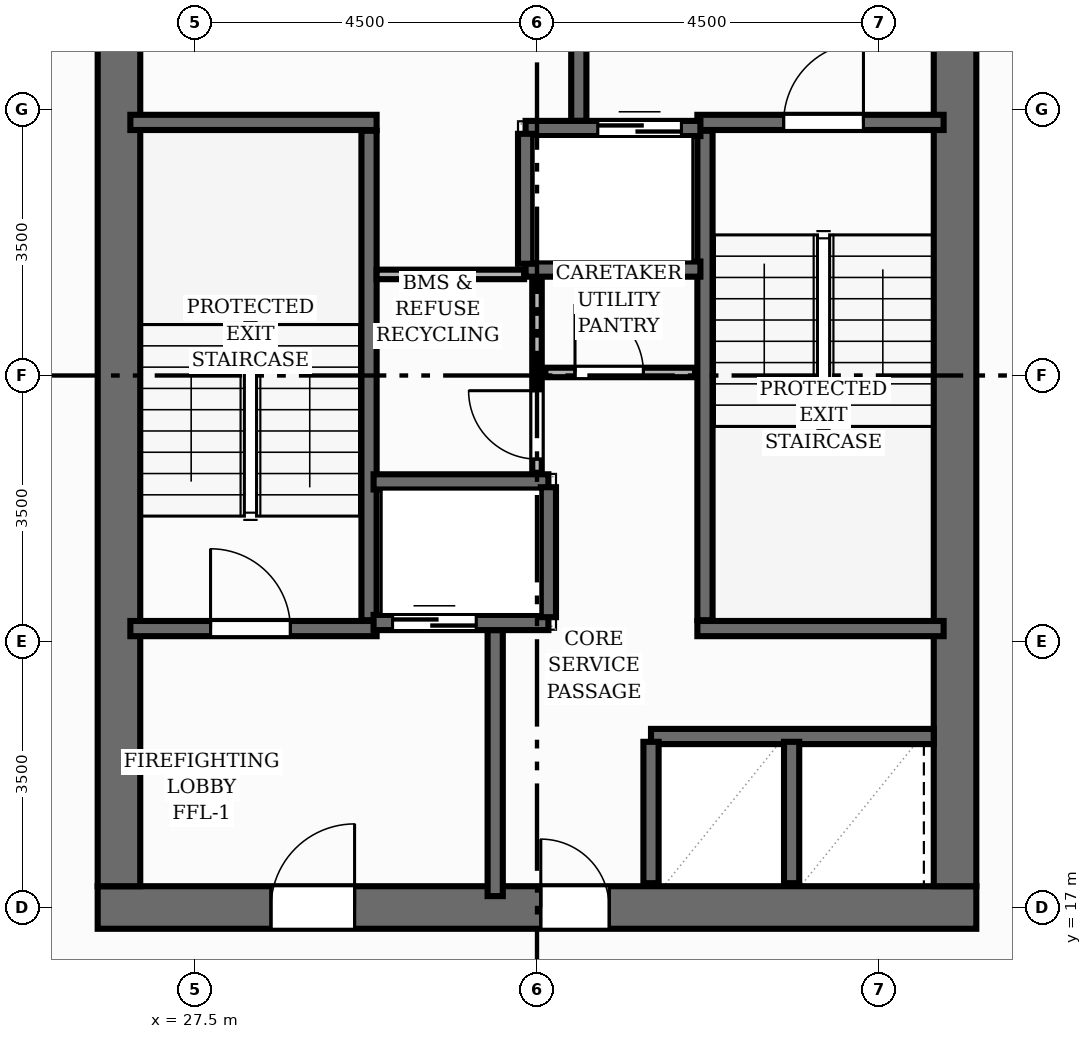
"""IFC4 building model, lengths in metres.
Left out: names, types, materials, properties, quantities, classifications, styles, units other than length and angle.
Written with IfcOpenShell. Run it as: python <this file> out.ifc"""

import sys

from ifc_helpers import new_model, si_unit, direction, frame, frame_2d, origin, place, context, subcontext, project, spatial, rectangle, extrude, element, fill, save


model = new_model("IFC4")
c1 = context("Model", 3, precision=1e-05, world=origin(), true_north=direction((0.0, 1.0)))
c2 = subcontext(c1, "Body", "Model", "MODEL_VIEW")
j1 = project(units=[si_unit("LENGTHUNIT", "METRE"), si_unit("PLANEANGLEUNIT", "RADIAN")], contexts=[c1])
p1 = place(None, origin())
s1 = spatial("IfcSite", under=j1, at=p1, CompositionType="ELEMENT")
p2 = place(p1, origin())
s2 = spatial("IfcBuilding", under=s1, at=p2, CompositionType="ELEMENT")
p3 = place(p2, frame((0.0, 0.0, 172.64)))
s3 = spatial("IfcBuildingStorey", under=s2, at=p3, CompositionType="ELEMENT", Elevation=172.64)
p4 = place(p3, frame((26.22, 17.0, 0.0), z_axis=(0.0, 0.0, 1.0), x_axis=(1.0, 0.0, 0.0)))
e1 = element("IfcWall", 1, at=p4, inside=s3, PredefinedType="SHEAR", context=c2, shape_type="SweptSolid", body=[
    extrude(rectangle(XDim=11.56, YDim=0.56, at=frame_2d((5.78, 0.0))), origin(), (0.0, 0.0, 1.0), 3.2),
])
p5 = place(p4, frame((2.28, 0.0, 0.0)))
e2 = element("IfcOpeningElement", 2, at=p5, cuts=e1, PredefinedType="OPENING", context=c2, shape_type="SweptSolid", body=[
    extrude(rectangle(XDim=1.1, YDim=2.15, at=frame_2d((0.55, 1.075))), frame((0.0, 0.29, 0.0), z_axis=(0.0, -1.0, 0.0), x_axis=(1.0, 0.0, 0.0)), (0.0, 0.0, 1.0), 0.58),
])
p6 = place(p4, frame((5.83, 0.0, 0.0)))
e3 = element("IfcOpeningElement", 3, at=p6, cuts=e1, PredefinedType="OPENING", context=c2, shape_type="SweptSolid", body=[
    extrude(rectangle(XDim=0.9, YDim=2.1, at=frame_2d((0.45, 1.05))), frame((0.0, 0.29, 0.0), z_axis=(0.0, -1.0, 0.0), x_axis=(1.0, 0.0, 0.0)), (0.0, 0.0, 1.0), 0.58),
])
for number, where, z_axis, x_axis in (
    (4, (26.5, 17.28, 0.0), (0.0, 0.0, 1.0), (0.0, 1.0, 0.0)),
    (5, (37.5, 17.28, 0.0), (0.0, 0.0, 1.0), (0.0, 1.0, 0.0)),
):
    element("IfcWall", number, at=place(p3, frame(where, z_axis=z_axis, x_axis=x_axis)), inside=s3, PredefinedType="SHEAR", context=c2, shape_type="SweptSolid", body=[
        extrude(rectangle(XDim=13.44, YDim=0.56, at=frame_2d((6.72, 0.0))), origin(), (0.0, 0.0, 1.0), 3.2),
    ])
p7 = place(p3, frame((29.79, 20.78, 0.0), z_axis=(0.0, 0.0, 1.0), x_axis=(0.0, 1.0, 0.0)))
e6 = element("IfcWall", 6, at=p7, inside=s3, PredefinedType="SHEAR", context=c2, shape_type="SweptSolid", body=[
    extrude(rectangle(XDim=6.44, YDim=0.2, at=frame_2d((3.22, 0.0))), origin(), (0.0, 0.0, 1.0), 3.2),
])
p8 = place(p3, frame((26.65, 27.33, 0.0), z_axis=(0.0, 0.0, 1.0), x_axis=(1.0, 0.0, 0.0)))
e7 = element("IfcWall", 7, at=p8, inside=s3, PredefinedType="SHEAR", context=c2, shape_type="SweptSolid", body=[
    extrude(rectangle(XDim=3.24, YDim=0.2, at=frame_2d((1.62, 0.0))), origin(), (0.0, 0.0, 1.0), 3.2),
])
p9 = place(p3, frame((26.65, 20.67, 0.0), z_axis=(0.0, 0.0, 1.0), x_axis=(1.0, 0.0, 0.0)))
e8 = element("IfcWall", 8, at=p9, inside=s3, PredefinedType="SHEAR", context=c2, shape_type="SweptSolid", body=[
    extrude(rectangle(XDim=3.24, YDim=0.2, at=frame_2d((1.62, 0.0))), origin(), (0.0, 0.0, 1.0), 3.2),
])
p10 = place(p9, frame((1.055, 0.0, 0.0)))
e9 = element("IfcOpeningElement", 9, at=p10, cuts=e8, PredefinedType="OPENING", context=c2, shape_type="SweptSolid", body=[
    extrude(rectangle(XDim=1.05, YDim=2.15, at=frame_2d((0.525, 1.075))), frame((0.0, 0.11, 0.0), z_axis=(0.0, -1.0, 0.0), x_axis=(1.0, 0.0, 0.0)), (0.0, 0.0, 1.0), 0.22),
])
p11 = place(p3, frame((34.21, 20.78, 0.0), z_axis=(0.0, 0.0, 1.0), x_axis=(0.0, 1.0, 0.0)))
e10 = element("IfcWall", 10, at=p11, inside=s3, PredefinedType="SHEAR", context=c2, shape_type="SweptSolid", body=[
    extrude(rectangle(XDim=6.44, YDim=0.2, at=frame_2d((3.22, 0.0))), origin(), (0.0, 0.0, 1.0), 3.2),
])
p12 = place(p3, frame((34.11, 20.67, 0.0), z_axis=(0.0, 0.0, 1.0), x_axis=(1.0, 0.0, 0.0)))
e11 = element("IfcWall", 11, at=p12, inside=s3, PredefinedType="SHEAR", context=c2, shape_type="SweptSolid", body=[
    extrude(rectangle(XDim=3.24, YDim=0.2, at=frame_2d((1.62, 0.0))), origin(), (0.0, 0.0, 1.0), 3.2),
])
p13 = place(p3, frame((34.11, 27.33, 0.0), z_axis=(0.0, 0.0, 1.0), x_axis=(1.0, 0.0, 0.0)))
e12 = element("IfcWall", 12, at=p13, inside=s3, PredefinedType="SHEAR", context=c2, shape_type="SweptSolid", body=[
    extrude(rectangle(XDim=3.24, YDim=0.2, at=frame_2d((1.62, 0.0))), origin(), (0.0, 0.0, 1.0), 3.2),
])
p14 = place(p13, frame((1.135, 0.0, 0.0)))
e13 = element("IfcOpeningElement", 13, at=p14, cuts=e12, PredefinedType="OPENING", context=c2, shape_type="SweptSolid", body=[
    extrude(rectangle(XDim=1.05, YDim=2.15, at=frame_2d((0.525, 1.075))), frame((0.0, 0.11, 0.0), z_axis=(0.0, -1.0, 0.0), x_axis=(1.0, 0.0, 0.0)), (0.0, 0.0, 1.0), 0.22),
])
for number, where, z_axis, x_axis in (
    (14, (31.45, 17.15, 0.0), (0.0, 0.0, 1.0), (0.0, 1.0, 0.0)),
    (15, (32.55, 27.35, 0.0), (0.0, 0.0, 1.0), (0.0, 1.0, 0.0)),
):
    element("IfcWall", number, at=place(p3, frame(where, z_axis=z_axis, x_axis=x_axis)), inside=s3, PredefinedType="SHEAR", context=c2, shape_type="SweptSolid", body=[
        extrude(rectangle(XDim=3.5, YDim=0.2, at=frame_2d((1.75, 0.0))), origin(), (0.0, 0.0, 1.0), 3.2),
    ])
p15 = place(p3, frame((29.85, 20.75, 0.0), z_axis=(0.0, 0.0, 1.0), x_axis=(1.0, 0.0, 0.0)))
e16 = element("IfcWall", 16, at=p15, inside=s3, PredefinedType="SHEAR", context=c2, shape_type="SweptSolid", body=[
    extrude(rectangle(XDim=2.3, YDim=0.2, at=frame_2d((1.15, 0.0))), origin(), (0.0, 0.0, 1.0), 3.2),
])
p16 = place(p15, frame((0.25, 0.0, 0.0)))
e17 = element("IfcOpeningElement", 17, at=p16, cuts=e16, PredefinedType="OPENING", context=c2, shape_type="SweptSolid", body=[
    extrude(rectangle(XDim=1.1, YDim=2.15, at=frame_2d((0.55, 1.075))), frame((0.0, 0.11, 0.0), z_axis=(0.0, -1.0, 0.0), x_axis=(1.0, 0.0, 0.0)), (0.0, 0.0, 1.0), 0.22),
])
p17 = place(p3, frame((29.85, 22.6, 0.0), z_axis=(0.0, 0.0, 1.0), x_axis=(1.0, 0.0, 0.0)))
e18 = element("IfcWall", 18, at=p17, inside=s3, PredefinedType="SHEAR", context=c2, shape_type="SweptSolid", body=[
    extrude(rectangle(XDim=2.3, YDim=0.2, at=frame_2d((1.15, 0.0))), origin(), (0.0, 0.0, 1.0), 3.2),
])
p18 = place(p3, frame((32.15, 20.82, 0.0), z_axis=(0.0, 0.0, 1.0), x_axis=(0.0, 1.0, 0.0)))
e19 = element("IfcWall", 19, at=p18, inside=s3, PredefinedType="SHEAR", context=c2, shape_type="SweptSolid", body=[
    extrude(rectangle(XDim=1.71, YDim=0.2, at=frame_2d((0.855, 0.0))), origin(), (0.0, 0.0, 1.0), 3.2),
])
p19 = place(p3, frame((31.85, 27.25, 0.0), z_axis=(0.0, 0.0, 1.0), x_axis=(1.0, 0.0, 0.0)))
e20 = element("IfcWall", 20, at=p19, inside=s3, PredefinedType="SHEAR", context=c2, shape_type="SweptSolid", body=[
    extrude(rectangle(XDim=2.3, YDim=0.2, at=frame_2d((1.15, 0.0))), origin(), (0.0, 0.0, 1.0), 3.2),
])
p20 = place(p19, frame((0.95, 0.0, 0.0)))
e21 = element("IfcOpeningElement", 21, at=p20, cuts=e20, PredefinedType="OPENING", context=c2, shape_type="SweptSolid", body=[
    extrude(rectangle(XDim=1.1, YDim=2.15, at=frame_2d((0.55, 1.075))), frame((0.0, 0.11, 0.0), z_axis=(0.0, -1.0, 0.0), x_axis=(1.0, 0.0, 0.0)), (0.0, 0.0, 1.0), 0.22),
])
p21 = place(p3, frame((31.85, 25.4, 0.0), z_axis=(0.0, 0.0, 1.0), x_axis=(1.0, 0.0, 0.0)))
e22 = element("IfcWall", 22, at=p21, inside=s3, PredefinedType="SHEAR", context=c2, shape_type="SweptSolid", body=[
    extrude(rectangle(XDim=2.3, YDim=0.2, at=frame_2d((1.15, 0.0))), origin(), (0.0, 0.0, 1.0), 3.2),
])
p22 = place(p3, frame((31.85, 25.47, 0.0), z_axis=(0.0, 0.0, 1.0), x_axis=(0.0, 1.0, 0.0)))
e23 = element("IfcWall", 23, at=p22, inside=s3, PredefinedType="SHEAR", context=c2, shape_type="SweptSolid", body=[
    extrude(rectangle(XDim=1.71, YDim=0.2, at=frame_2d((0.855, 0.0))), origin(), (0.0, 0.0, 1.0), 3.2),
])
p23 = place(p3, frame((33.5, 19.25, 0.0), z_axis=(0.0, 0.0, 1.0), x_axis=(1.0, 0.0, 0.0)))
e24 = element("IfcWall", 24, at=p23, inside=s3, PredefinedType="SHEAR", context=c2, shape_type="SweptSolid", body=[
    extrude(rectangle(XDim=3.72, YDim=0.2, at=frame_2d((1.86, 0.0))), origin(), (0.0, 0.0, 1.0), 3.2),
])
for number, where, z_axis, x_axis in (
    (25, (33.5, 17.32, 0.0), (0.0, 0.0, 1.0), (0.0, 1.0, 0.0)),
    (26, (35.35, 17.32, 0.0), (0.0, 0.0, 1.0), (0.0, 1.0, 0.0)),
):
    element("IfcWall", number, at=place(p3, frame(where, z_axis=z_axis, x_axis=x_axis)), inside=s3, PredefinedType="SHEAR", context=c2, shape_type="SweptSolid", body=[
        extrude(rectangle(XDim=1.86, YDim=0.2, at=frame_2d((0.93, 0.0))), origin(), (0.0, 0.0, 1.0), 3.2),
    ])
p24 = place(p3, frame((32.0, 22.72, 0.0), z_axis=(0.0, 0.0, 1.0), x_axis=(0.0, 1.0, 0.0)))
e27 = element("IfcWall", 27, at=p24, inside=s3, PredefinedType="PARTITIONING", context=c2, shape_type="SweptSolid", body=[
    extrude(rectangle(XDim=2.52, YDim=0.125, at=frame_2d((1.26, 0.0))), origin(), (0.0, 0.0, 1.0), 2.955),
])
p25 = place(p24, frame((0.18, 0.0, 0.0)))
e28 = element("IfcOpeningElement", 28, at=p25, cuts=e27, PredefinedType="OPENING", context=c2, shape_type="SweptSolid", body=[
    extrude(rectangle(XDim=0.9, YDim=2.1, at=frame_2d((0.45, 1.05))), frame((0.0, 0.073, 0.0), z_axis=(0.0, -1.0, 0.0), x_axis=(1.0, 0.0, 0.0)), (0.0, 0.0, 1.0), 0.145),
])
p26 = place(p3, frame((32.11, 24.04, 0.0), z_axis=(0.0, 0.0, 1.0), x_axis=(1.0, 0.0, 0.0)))
e29 = element("IfcWall", 29, at=p26, inside=s3, PredefinedType="PARTITIONING", context=c2, shape_type="SweptSolid", body=[
    extrude(rectangle(XDim=1.97, YDim=0.125, at=frame_2d((0.985, 0.0))), origin(), (0.0, 0.0, 1.0), 2.955),
])
p27 = place(p26, frame((0.39, 0.0, 0.0)))
e30 = element("IfcOpeningElement", 30, at=p27, cuts=e29, PredefinedType="OPENING", context=c2, shape_type="SweptSolid", body=[
    extrude(rectangle(XDim=0.9, YDim=2.1, at=frame_2d((0.45, 1.05))), frame((0.0, 0.073, 0.0), z_axis=(0.0, -1.0, 0.0), x_axis=(1.0, 0.0, 0.0)), (0.0, 0.0, 1.0), 0.145),
])
p28 = place(p3, frame((29.89, 25.33, 0.0), z_axis=(0.0, 0.0, 1.0), x_axis=(1.0, 0.0, 0.0)))
e31 = element("IfcWall", 31, at=p28, inside=s3, PredefinedType="PARTITIONING", context=c2, shape_type="SweptSolid", body=[
    extrude(rectangle(XDim=1.94, YDim=0.125, at=frame_2d((0.97, 0.0))), origin(), (0.0, 0.0, 1.0), 2.955),
])
p29 = place(p10, origin())
e32 = element("IfcDoor", 32, at=p29, inside=s3, OperationType="SINGLE_SWING_LEFT", PredefinedType="DOOR", context=c2, shape_type="SweptSolid", body=[
    extrude(rectangle(XDim=1.05, YDim=2.15, at=frame_2d((0.525, 1.075))), frame((0.0, 0.025, 0.0), z_axis=(0.0, -1.0, 0.0), x_axis=(1.0, 0.0, 0.0)), (0.0, 0.0, 1.0), 0.05),
])
fill(e9, e32)
p30 = place(p14, origin())
e33 = element("IfcDoor", 33, at=p30, inside=s3, OperationType="SINGLE_SWING_RIGHT", PredefinedType="DOOR", context=c2, shape_type="SweptSolid", body=[
    extrude(rectangle(XDim=1.05, YDim=2.15, at=frame_2d((0.525, 1.075))), frame((0.0, 0.025, 0.0), z_axis=(0.0, -1.0, 0.0), x_axis=(1.0, 0.0, 0.0)), (0.0, 0.0, 1.0), 0.05),
])
fill(e13, e33)
p31 = place(p5, origin())
e34 = element("IfcDoor", 34, at=p31, inside=s3, OperationType="SINGLE_SWING_RIGHT", PredefinedType="DOOR", context=c2, shape_type="SweptSolid", body=[
    extrude(rectangle(XDim=1.1, YDim=2.15, at=frame_2d((0.55, 1.075))), frame((0.0, 0.025, 0.0), z_axis=(0.0, -1.0, 0.0), x_axis=(1.0, 0.0, 0.0)), (0.0, 0.0, 1.0), 0.05),
])
fill(e2, e34)
p32 = place(p16, origin())
e35 = element("IfcDoor", 35, at=p32, inside=s3, OperationType="DOUBLE_DOOR_SLIDING", PredefinedType="DOOR", context=c2, shape_type="SweptSolid", body=[
    extrude(rectangle(XDim=1.1, YDim=2.15, at=frame_2d((0.55, 1.075))), frame((0.0, 0.025, 0.0), z_axis=(0.0, -1.0, 0.0), x_axis=(1.0, 0.0, 0.0)), (0.0, 0.0, 1.0), 0.05),
])
fill(e17, e35)
p33 = place(p20, origin())
e36 = element("IfcDoor", 36, at=p33, inside=s3, OperationType="DOUBLE_DOOR_SLIDING", PredefinedType="DOOR", context=c2, shape_type="SweptSolid", body=[
    extrude(rectangle(XDim=1.1, YDim=2.15, at=frame_2d((0.55, 1.075))), frame((0.0, 0.025, 0.0), z_axis=(0.0, -1.0, 0.0), x_axis=(1.0, 0.0, 0.0)), (0.0, 0.0, 1.0), 0.05),
])
fill(e21, e36)
p34 = place(p6, origin())
e37 = element("IfcDoor", 37, at=p34, inside=s3, OperationType="SINGLE_SWING_LEFT", PredefinedType="DOOR", context=c2, shape_type="SweptSolid", body=[
    extrude(rectangle(XDim=0.9, YDim=2.1, at=frame_2d((0.45, 1.05))), frame((0.0, 0.025, 0.0), z_axis=(0.0, -1.0, 0.0), x_axis=(1.0, 0.0, 0.0)), (0.0, 0.0, 1.0), 0.05),
])
fill(e3, e37)
p35 = place(p27, origin())
e38 = element("IfcDoor", 38, at=p35, inside=s3, OperationType="SINGLE_SWING_LEFT", PredefinedType="DOOR", context=c2, shape_type="SweptSolid", body=[
    extrude(rectangle(XDim=0.9, YDim=2.1, at=frame_2d((0.45, 1.05))), frame((0.0, 0.025, 0.0), z_axis=(0.0, -1.0, 0.0), x_axis=(1.0, 0.0, 0.0)), (0.0, 0.0, 1.0), 0.05),
])
fill(e30, e38)
p36 = place(p25, origin())
e39 = element("IfcDoor", 39, at=p36, inside=s3, OperationType="SINGLE_SWING_RIGHT", PredefinedType="DOOR", context=c2, shape_type="SweptSolid", body=[
    extrude(rectangle(XDim=0.9, YDim=2.1, at=frame_2d((0.45, 1.05))), frame((0.0, 0.025, 0.0), z_axis=(0.0, -1.0, 0.0), x_axis=(1.0, 0.0, 0.0)), (0.0, 0.0, 1.0), 0.05),
])
fill(e28, e39)
save(model, sys.argv[1])
